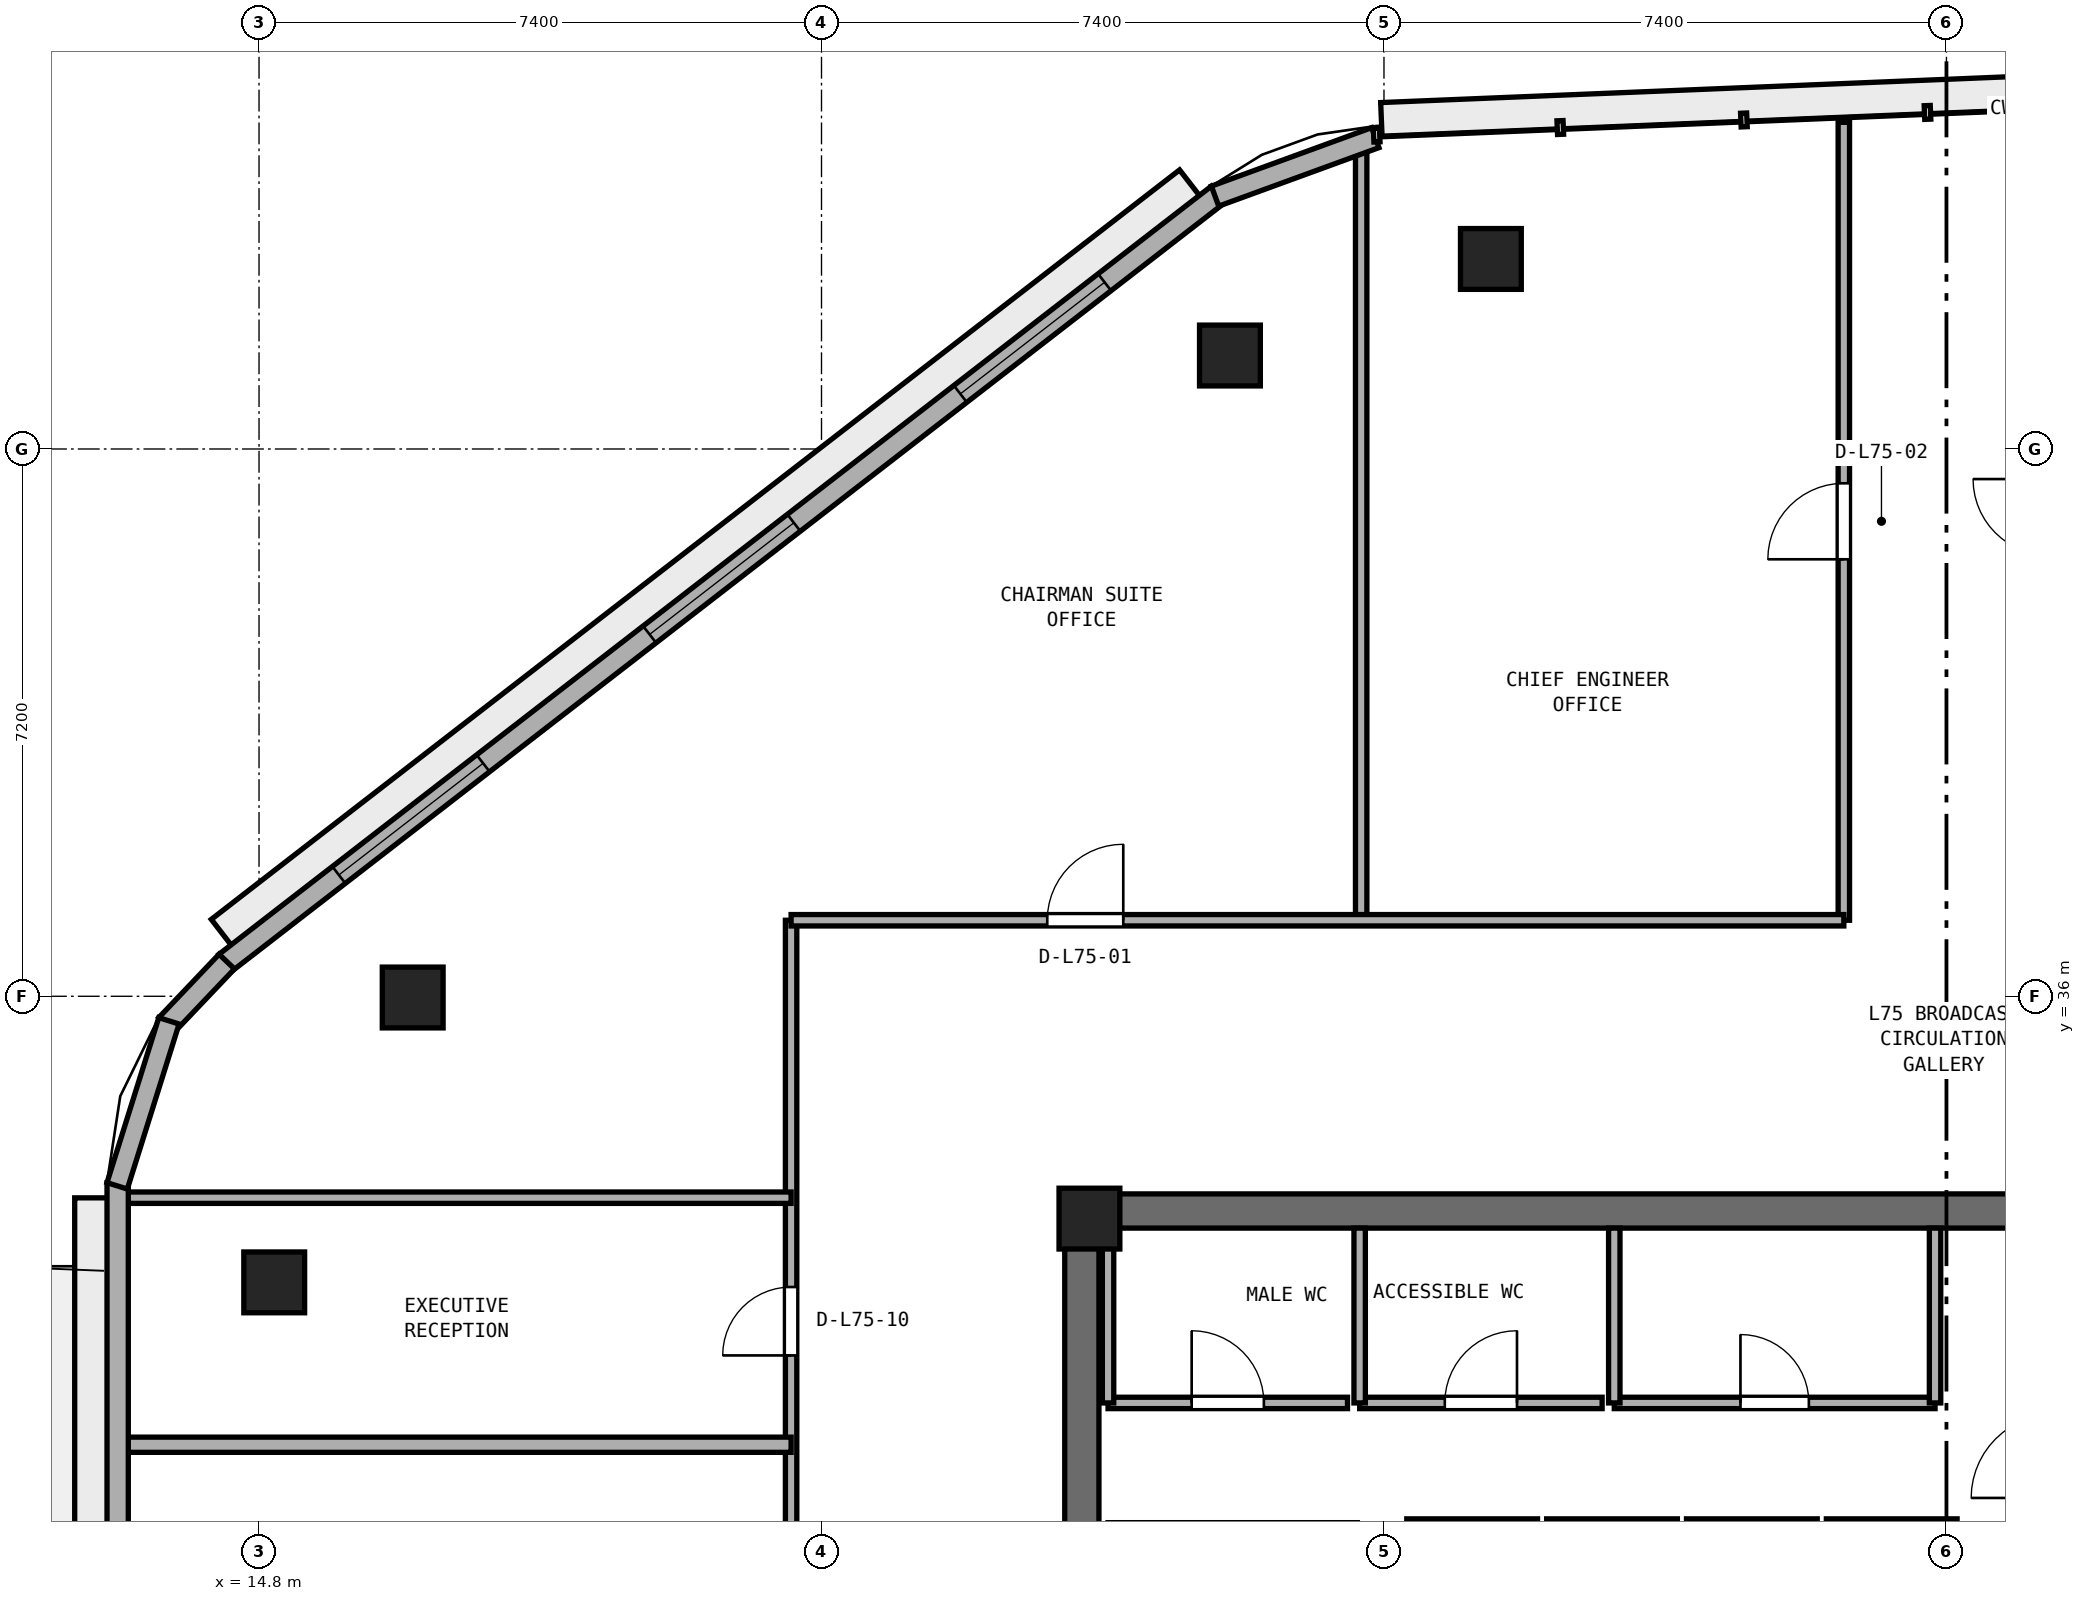
"""IFC4 building model, lengths in metres.
Left out: names, types, materials, properties, quantities, classifications, styles, units other than length and angle.
Written with IfcOpenShell. Run it as: python <this file> out.ifc"""

import sys

from ifc_helpers import new_model, si_unit, direction, frame, frame_2d, origin, origin_2d, place, context, subcontext, project, spatial, rectangle, extrude, element, fill, save


model = new_model("IFC4")
c1 = context("Model", 3, precision=1e-05, world=origin(), true_north=direction((0.0, 1.0)))
c2 = subcontext(c1, "Body", "Model", "MODEL_VIEW")
j1 = project(units=[si_unit("LENGTHUNIT", "METRE"), si_unit("PLANEANGLEUNIT", "RADIAN")], contexts=[c1])
p1 = place(None, origin())
s1 = spatial("IfcSite", under=j1, at=p1, CompositionType="ELEMENT")
p2 = place(p1, origin())
s2 = spatial("IfcBuilding", under=s1, at=p2, CompositionType="ELEMENT")
p3 = place(p2, frame((0.0, 0.0, 293.4)))
s3 = spatial("IfcBuildingStorey", under=s2, at=p3, CompositionType="ELEMENT", Elevation=293.4)
p4 = place(p3, frame((25.4, 33.175, 0.0), z_axis=(0.0, 0.0, 1.0), x_axis=(1.0, 0.0, 0.0)))
e1 = element("IfcWall", 1, at=p4, inside=s3, PredefinedType="SHEAR", context=c2, shape_type="SweptSolid", body=[
    extrude(rectangle(XDim=23.2, YDim=0.45, at=frame_2d((11.6, 0.0))), origin(), (0.0, 0.0, 1.0), 3.54),
])
p5 = place(p3, frame((25.625, 17.45, 0.0), z_axis=(0.0, 0.0, 1.0), x_axis=(0.0, 1.0, 0.0)))
e2 = element("IfcWall", 2, at=p5, inside=s3, PredefinedType="SHEAR", context=c2, shape_type="SweptSolid", body=[
    extrude(rectangle(XDim=15.5, YDim=0.45, at=frame_2d((7.75, 0.0))), origin(), (0.0, 0.0, 1.0), 3.54),
])
p6 = place(p5, frame((7.0, 0.0, 0.0)))
e3 = element("IfcOpeningElement", 3, at=p6, cuts=e2, PredefinedType="OPENING", context=c2, shape_type="SweptSolid", body=[
    extrude(rectangle(XDim=1.5, YDim=2.15, at=frame_2d((0.75, 1.075))), frame((0.0, 0.235, 0.0), z_axis=(0.0, -1.0, 0.0), x_axis=(1.0, 0.0, 0.0)), (0.0, 0.0, 1.0), 0.47),
])
p7 = place(p3, frame((25.725, 33.075, 0.0), z_axis=(0.0, 0.0, 1.0), x_axis=(1.0, 0.0, 0.0)))
e4 = element("IfcColumn", 4, at=p7, inside=s3, PredefinedType="PILASTER", context=c2, shape_type="SweptSolid", body=[
    extrude(rectangle(XDim=0.8, YDim=0.8, at=origin_2d()), origin(), (0.0, 0.0, 1.0), 3.8),
])
for number, where, z_axis, x_axis in (
    (5, (31.007, 45.7, 0.0), (0.0, 0.0, 1.0), (1.0, 0.0, 0.0)),
    (6, (27.573, 44.43, 0.0), (0.0, 0.0, 1.0), (1.0, 0.0, 0.0)),
    (7, (16.822, 35.984, 0.0), (0.0, 0.0, 1.0), (1.0, 0.0, 0.0)),
    (8, (15.0, 32.236, 0.0), (0.0, 0.0, 1.0), (1.0, 0.0, 0.0)),
):
    element("IfcColumn", number, at=place(p3, frame(where, z_axis=z_axis, x_axis=x_axis)), inside=s3, PredefinedType="COLUMN", context=c2, shape_type="SweptSolid", body=[
        extrude(rectangle(XDim=0.8, YDim=0.8, at=origin_2d()), origin(), (0.0, 0.0, 1.0), 3.8),
    ])
p8 = place(p3, frame((29.9, 29.0, 0.0), z_axis=(0.0, 0.0, 1.0), x_axis=(1.0, 0.0, 0.0)))
e9 = element("IfcWall", 9, at=p8, inside=s3, PredefinedType="SHEAR", context=c2, shape_type="SweptSolid", body=[
    extrude(rectangle(XDim=1.72, YDim=0.25, at=frame_2d((0.86, 0.0))), origin(), (0.0, 0.0, 1.0), 3.54),
])
for number, where, z_axis, x_axis in (
    (10, (31.74, 29.0, 0.0), (0.0, 0.0, 1.0), (1.0, 0.0, 0.0)),
    (11, (33.58, 29.0, 0.0), (0.0, 0.0, 1.0), (1.0, 0.0, 0.0)),
    (12, (35.42, 29.0, 0.0), (0.0, 0.0, 1.0), (1.0, 0.0, 0.0)),
):
    element("IfcWall", number, at=place(p3, frame(where, z_axis=z_axis, x_axis=x_axis)), inside=s3, PredefinedType="SHEAR", context=c2, shape_type="SweptSolid", body=[
        extrude(rectangle(XDim=1.72, YDim=0.25, at=frame_2d((0.86, 0.0))), origin(), (0.0, 0.0, 1.0), 3.54),
    ])
p9 = place(p3, frame((25.97, 30.65, 0.0), z_axis=(0.0, 0.0, 1.0), x_axis=(1.0, 0.0, 0.0)))
e13 = element("IfcWall", 13, at=p9, inside=s3, PredefinedType="PARTITIONING", context=c2, shape_type="SweptSolid", body=[
    extrude(rectangle(XDim=3.15, YDim=0.15, at=frame_2d((1.575, 0.0))), origin(), (0.0, 0.0, 1.0), 3.54),
])
p10 = place(p9, frame((1.1, 0.0, 0.0)))
e14 = element("IfcOpeningElement", 14, at=p10, cuts=e13, PredefinedType="OPENING", context=c2, shape_type="SweptSolid", body=[
    extrude(rectangle(XDim=0.95, YDim=2.1, at=frame_2d((0.475, 1.05))), frame((0.0, 0.085, 0.0), z_axis=(0.0, -1.0, 0.0), x_axis=(1.0, 0.0, 0.0)), (0.0, 0.0, 1.0), 0.17),
])
p11 = place(p3, frame((25.97, 30.65, 0.0), z_axis=(0.0, 0.0, 1.0), x_axis=(0.0, 1.0, 0.0)))
e15 = element("IfcWall", 15, at=p11, inside=s3, PredefinedType="PARTITIONING", context=c2, shape_type="SweptSolid", body=[
    extrude(rectangle(XDim=2.3, YDim=0.15, at=frame_2d((1.15, 0.0))), origin(), (0.0, 0.0, 1.0), 2.64),
])
p12 = place(p3, frame((29.28, 30.65, 0.0), z_axis=(0.0, 0.0, 1.0), x_axis=(1.0, 0.0, 0.0)))
e16 = element("IfcWall", 16, at=p12, inside=s3, PredefinedType="PARTITIONING", context=c2, shape_type="SweptSolid", body=[
    extrude(rectangle(XDim=3.19, YDim=0.15, at=frame_2d((1.595, 0.0))), origin(), (0.0, 0.0, 1.0), 3.54),
])
p13 = place(p12, frame((1.12, 0.0, 0.0)))
e17 = element("IfcOpeningElement", 17, at=p13, cuts=e16, PredefinedType="OPENING", context=c2, shape_type="SweptSolid", body=[
    extrude(rectangle(XDim=0.95, YDim=2.1, at=frame_2d((0.475, 1.05))), frame((0.0, 0.085, 0.0), z_axis=(0.0, -1.0, 0.0), x_axis=(1.0, 0.0, 0.0)), (0.0, 0.0, 1.0), 0.17),
])
p14 = place(p3, frame((29.28, 30.65, 0.0), z_axis=(0.0, 0.0, 1.0), x_axis=(0.0, 1.0, 0.0)))
e18 = element("IfcWall", 18, at=p14, inside=s3, PredefinedType="PARTITIONING", context=c2, shape_type="SweptSolid", body=[
    extrude(rectangle(XDim=2.3, YDim=0.15, at=frame_2d((1.15, 0.0))), origin(), (0.0, 0.0, 1.0), 3.54),
])
p15 = place(p3, frame((32.63, 30.65, 0.0), z_axis=(0.0, 0.0, 1.0), x_axis=(1.0, 0.0, 0.0)))
e19 = element("IfcWall", 19, at=p15, inside=s3, PredefinedType="PARTITIONING", context=c2, shape_type="SweptSolid", body=[
    extrude(rectangle(XDim=4.22, YDim=0.15, at=frame_2d((2.11, 0.0))), origin(), (0.0, 0.0, 1.0), 3.54),
])
p16 = place(p15, frame((1.66, 0.0, 0.0)))
e20 = element("IfcOpeningElement", 20, at=p16, cuts=e19, PredefinedType="OPENING", context=c2, shape_type="SweptSolid", body=[
    extrude(rectangle(XDim=0.9, YDim=2.1, at=frame_2d((0.45, 1.05))), frame((0.0, 0.085, 0.0), z_axis=(0.0, -1.0, 0.0), x_axis=(1.0, 0.0, 0.0)), (0.0, 0.0, 1.0), 0.17),
])
for number, where, z_axis, x_axis in (
    (21, (32.63, 30.65, 0.0), (0.0, 0.0, 1.0), (0.0, 1.0, 0.0)),
    (22, (36.85, 30.65, 0.0), (0.0, 0.0, 1.0), (0.0, 1.0, 0.0)),
):
    element("IfcWall", number, at=place(p3, frame(where, z_axis=z_axis, x_axis=x_axis)), inside=s3, PredefinedType="PARTITIONING", context=c2, shape_type="SweptSolid", body=[
        extrude(rectangle(XDim=2.3, YDim=0.15, at=frame_2d((1.15, 0.0))), origin(), (0.0, 0.0, 1.0), 3.54),
    ])
p17 = place(p3, frame((35.65, 37.0, 0.0), z_axis=(0.0, 0.0, 1.0), x_axis=(0.0, 1.0, 0.0)))
e23 = element("IfcWall", 23, at=p17, inside=s3, PredefinedType="PARTITIONING", context=c2, shape_type="SweptSolid", body=[
    extrude(rectangle(XDim=10.498, YDim=0.15, at=frame_2d((5.249, 0.0))), origin(), (0.0, 0.0, 1.0), 3.54),
])
p18 = place(p17, frame((4.749, 0.0, 0.0)))
e24 = element("IfcOpeningElement", 24, at=p18, cuts=e23, PredefinedType="OPENING", context=c2, shape_type="SweptSolid", body=[
    extrude(rectangle(XDim=1.0, YDim=2.12, at=frame_2d((0.5, 1.06))), frame((0.0, 0.085, 0.0), z_axis=(0.0, -1.0, 0.0), x_axis=(1.0, 0.0, 0.0)), (0.0, 0.0, 1.0), 0.17),
])
p19 = place(p3, frame((29.3, 37.0, 0.0), z_axis=(0.0, 0.0, 1.0), x_axis=(0.0, 1.0, 0.0)))
e25 = element("IfcWall", 25, at=p19, inside=s3, PredefinedType="PARTITIONING", context=c2, shape_type="SweptSolid", body=[
    extrude(rectangle(XDim=10.216, YDim=0.15, at=frame_2d((5.108, 0.0))), origin(), (0.0, 0.0, 1.0), 3.54),
])
p20 = place(p3, frame((21.8, 7.79, 0.0), z_axis=(0.0, 0.0, 1.0), x_axis=(0.0, 1.0, 0.0)))
e26 = element("IfcWall", 26, at=p20, inside=s3, PredefinedType="PARTITIONING", context=c2, shape_type="SweptSolid", body=[
    extrude(rectangle(XDim=29.21, YDim=0.15, at=frame_2d((14.605, 0.0))), origin(), (0.0, 0.0, 1.0), 3.54),
])
p21 = place(p20, frame((9.76, 0.0, 0.0)))
e27 = element("IfcOpeningElement", 27, at=p21, cuts=e26, PredefinedType="OPENING", context=c2, shape_type="SweptSolid", body=[
    extrude(rectangle(XDim=0.9, YDim=2.1, at=frame_2d((0.45, 1.05))), frame((0.0, 0.085, 0.0), z_axis=(0.0, -1.0, 0.0), x_axis=(1.0, 0.0, 0.0)), (0.0, 0.0, 1.0), 0.17),
])
p22 = place(p20, frame((18.11, 0.0, 0.0)))
e28 = element("IfcOpeningElement", 28, at=p22, cuts=e26, PredefinedType="OPENING", context=c2, shape_type="SweptSolid", body=[
    extrude(rectangle(XDim=0.9, YDim=2.1, at=frame_2d((0.45, 1.05))), frame((0.0, 0.085, 0.0), z_axis=(0.0, -1.0, 0.0), x_axis=(1.0, 0.0, 0.0)), (0.0, 0.0, 1.0), 0.17),
])
p23 = place(p20, frame((23.485, 0.0, 0.0)))
e29 = element("IfcOpeningElement", 29, at=p23, cuts=e26, PredefinedType="OPENING", context=c2, shape_type="SweptSolid", body=[
    extrude(rectangle(XDim=0.9, YDim=2.1, at=frame_2d((0.45, 1.05))), frame((0.0, 0.085, 0.0), z_axis=(0.0, -1.0, 0.0), x_axis=(1.0, 0.0, 0.0)), (0.0, 0.0, 1.0), 0.17),
])
p24 = place(p3, frame((13.005, 30.1, 0.0), z_axis=(0.0, 0.0, 1.0), x_axis=(1.0, 0.0, 0.0)))
e30 = element("IfcWall", 30, at=p24, inside=s3, PredefinedType="PARTITIONING", context=c2, shape_type="SweptSolid", body=[
    extrude(rectangle(XDim=8.795, YDim=0.2, at=frame_2d((4.397, 0.0))), origin(), (0.0, 0.0, 1.0), 3.54),
])
p25 = place(p3, frame((13.005, 33.35, 0.0), z_axis=(0.0, 0.0, 1.0), x_axis=(1.0, 0.0, 0.0)))
e31 = element("IfcWall", 31, at=p25, inside=s3, PredefinedType="PARTITIONING", context=c2, shape_type="SweptSolid", body=[
    extrude(rectangle(XDim=8.795, YDim=0.15, at=frame_2d((4.397, 0.0))), origin(), (0.0, 0.0, 1.0), 3.54),
])
p26 = place(p3, frame((21.8, 37.0, 0.0), z_axis=(0.0, 0.0, 1.0), x_axis=(1.0, 0.0, 0.0)))
e32 = element("IfcWall", 32, at=p26, inside=s3, PredefinedType="PARTITIONING", context=c2, shape_type="SweptSolid", body=[
    extrude(rectangle(XDim=13.85, YDim=0.15, at=frame_2d((6.925, 0.0))), origin(), (0.0, 0.0, 1.0), 3.54),
])
p27 = place(p26, frame((3.37, 0.0, 0.0)))
e33 = element("IfcOpeningElement", 33, at=p27, cuts=e32, PredefinedType="OPENING", context=c2, shape_type="SweptSolid", body=[
    extrude(rectangle(XDim=1.0, YDim=2.12, at=frame_2d((0.5, 1.06))), frame((0.0, 0.085, 0.0), z_axis=(0.0, -1.0, 0.0), x_axis=(1.0, 0.0, 0.0)), (0.0, 0.0, 1.0), 0.17),
])
p28 = place(p3, frame((27.415, 46.547, 0.0), z_axis=(0.0, 0.0, 1.0), x_axis=(-0.790789745248, -0.612087884875, 0.0)))
e34 = element("IfcWall", 34, at=p28, inside=s3, PredefinedType="STANDARD", context=c2, shape_type="SweptSolid", body=[
    extrude(rectangle(XDim=16.509, YDim=0.28, at=frame_2d((8.254, 0.0))), origin(), (0.0, 0.0, 1.0), 3.54),
])
p29 = place(p28, frame((1.885, 0.0, 0.9)))
e35 = element("IfcOpeningElement", 35, at=p29, cuts=e34, PredefinedType="OPENING", context=c2, shape_type="SweptSolid", body=[
    extrude(rectangle(XDim=2.4, YDim=1.75, at=frame_2d((1.2, 0.875))), frame((0.0, 0.15, 0.0), z_axis=(0.0, -1.0, 0.0), x_axis=(1.0, 0.0, 0.0)), (0.0, 0.0, 1.0), 0.3),
])
p30 = place(p28, frame((7.055, 0.0, 0.9)))
e36 = element("IfcOpeningElement", 36, at=p30, cuts=e34, PredefinedType="OPENING", context=c2, shape_type="SweptSolid", body=[
    extrude(rectangle(XDim=2.4, YDim=1.75, at=frame_2d((1.2, 0.875))), frame((0.0, 0.15, 0.0), z_axis=(0.0, -1.0, 0.0), x_axis=(1.0, 0.0, 0.0)), (0.0, 0.0, 1.0), 0.3),
])
p31 = place(p28, frame((12.224, 0.0, 0.9)))
e37 = element("IfcOpeningElement", 37, at=p31, cuts=e34, PredefinedType="OPENING", context=c2, shape_type="SweptSolid", body=[
    extrude(rectangle(XDim=2.4, YDim=1.75, at=frame_2d((1.2, 0.875))), frame((0.0, 0.15, 0.0), z_axis=(0.0, -1.0, 0.0), x_axis=(1.0, 0.0, 0.0)), (0.0, 0.0, 1.0), 0.3),
])
p32 = place(p3, frame((12.94, 33.548, 0.0), z_axis=(0.0, 0.0, 1.0), x_axis=(0.0, -1.0, 0.0)))
e38 = element("IfcWall", 38, at=p32, inside=s3, PredefinedType="STANDARD", context=c2, shape_type="SweptSolid", body=[
    extrude(rectangle(XDim=17.496, YDim=0.28, at=frame_2d((8.748, 0.0))), origin(), (0.0, 0.0, 1.0), 3.54),
])
p33 = place(p32, frame((8.198, 0.0, 0.0)))
e39 = element("IfcOpeningElement", 39, at=p33, cuts=e38, PredefinedType="OPENING", context=c2, shape_type="SweptSolid", body=[
    extrude(rectangle(XDim=1.1, YDim=2.2, at=frame_2d((0.55, 1.1))), frame((0.0, 0.15, 0.0), z_axis=(0.0, -1.0, 0.0), x_axis=(1.0, 0.0, 0.0)), (0.0, 0.0, 1.0), 0.3),
])
p34 = place(p32, frame((13.047, 0.0, 0.9)))
e40 = element("IfcOpeningElement", 40, at=p34, cuts=e38, PredefinedType="OPENING", context=c2, shape_type="SweptSolid", body=[
    extrude(rectangle(XDim=2.4, YDim=1.75, at=frame_2d((1.2, 0.875))), frame((0.0, 0.15, 0.0), z_axis=(0.0, -1.0, 0.0), x_axis=(1.0, 0.0, 0.0)), (0.0, 0.0, 1.0), 0.3),
])
p35 = place(p3, frame((29.486, 47.296, 0.0), z_axis=(0.0, 0.0, 1.0), x_axis=(-0.939434048497, -0.342729731019, 0.0)))
e41 = element("IfcWall", 41, at=p35, inside=s3, PredefinedType="STANDARD", context=c2, shape_type="SweptSolid", body=[
    extrude(rectangle(XDim=2.245, YDim=0.28, at=frame_2d((1.122, 0.0))), origin(), (0.0, 0.0, 1.0), 3.54),
])
p36 = place(p3, frame((14.375, 36.457, 0.0), z_axis=(0.0, 0.0, 1.0), x_axis=(-0.68895569752, -0.724803453948, 0.0)))
e42 = element("IfcWall", 42, at=p36, inside=s3, PredefinedType="STANDARD", context=c2, shape_type="SweptSolid", body=[
    extrude(rectangle(XDim=1.151, YDim=0.28, at=frame_2d((0.575, 0.0))), origin(), (0.0, 0.0, 1.0), 3.54),
])
p37 = place(p3, frame((13.615, 35.677, 0.0), z_axis=(0.0, 0.0, 1.0), x_axis=(-0.299374552426, -0.954135670311, 0.0)))
e43 = element("IfcWall", 43, at=p37, inside=s3, PredefinedType="STANDARD", context=c2, shape_type="SweptSolid", body=[
    extrude(rectangle(XDim=2.275, YDim=0.28, at=frame_2d((1.138, 0.0))), origin(), (0.0, 0.0, 1.0), 3.54),
])
p38 = place(p10, origin())
e44 = element("IfcDoor", 44, at=p38, inside=s3, OperationType="SINGLE_SWING_LEFT", PredefinedType="DOOR", context=c2, shape_type="SweptSolid", body=[
    extrude(rectangle(XDim=0.95, YDim=2.1, at=frame_2d((0.475, 1.05))), frame((0.0, 0.025, 0.0), z_axis=(0.0, -1.0, 0.0), x_axis=(1.0, 0.0, 0.0)), (0.0, 0.0, 1.0), 0.05),
])
fill(e14, e44)
p39 = place(p13, origin())
e45 = element("IfcDoor", 45, at=p39, inside=s3, OperationType="SINGLE_SWING_RIGHT", PredefinedType="DOOR", context=c2, shape_type="SweptSolid", body=[
    extrude(rectangle(XDim=0.95, YDim=2.1, at=frame_2d((0.475, 1.05))), frame((0.0, 0.025, 0.0), z_axis=(0.0, -1.0, 0.0), x_axis=(1.0, 0.0, 0.0)), (0.0, 0.0, 1.0), 0.05),
])
fill(e17, e45)
p40 = place(p16, origin())
e46 = element("IfcDoor", 46, at=p40, inside=s3, OperationType="SINGLE_SWING_LEFT", PredefinedType="DOOR", context=c2, shape_type="SweptSolid", body=[
    extrude(rectangle(XDim=0.9, YDim=2.1, at=frame_2d((0.45, 1.05))), frame((0.0, 0.025, 0.0), z_axis=(0.0, -1.0, 0.0), x_axis=(1.0, 0.0, 0.0)), (0.0, 0.0, 1.0), 0.05),
])
fill(e20, e46)
p41 = place(p27, origin())
e47 = element("IfcDoor", 47, at=p41, inside=s3, OperationType="SINGLE_SWING_RIGHT", PredefinedType="DOOR", context=c2, shape_type="SweptSolid", body=[
    extrude(rectangle(XDim=1.0, YDim=2.12, at=frame_2d((0.5, 1.06))), frame((0.0, 0.025, 0.0), z_axis=(0.0, -1.0, 0.0), x_axis=(1.0, 0.0, 0.0)), (0.0, 0.0, 1.0), 0.05),
])
fill(e33, e47)
p42 = place(p18, origin())
e48 = element("IfcDoor", 48, at=p42, inside=s3, OperationType="SINGLE_SWING_LEFT", PredefinedType="DOOR", context=c2, shape_type="SweptSolid", body=[
    extrude(rectangle(XDim=1.0, YDim=2.12, at=frame_2d((0.5, 1.06))), frame((0.0, 0.025, 0.0), z_axis=(0.0, -1.0, 0.0), x_axis=(1.0, 0.0, 0.0)), (0.0, 0.0, 1.0), 0.05),
])
fill(e24, e48)
p43 = place(p23, origin())
e49 = element("IfcDoor", 49, at=p43, inside=s3, OperationType="SINGLE_SWING_LEFT", PredefinedType="DOOR", context=c2, shape_type="SweptSolid", body=[
    extrude(rectangle(XDim=0.9, YDim=2.1, at=frame_2d((0.45, 1.05))), frame((0.0, 0.025, 0.0), z_axis=(0.0, -1.0, 0.0), x_axis=(1.0, 0.0, 0.0)), (0.0, 0.0, 1.0), 0.05),
])
fill(e29, e49)
p44 = place(p29, origin())
e50 = element("IfcWindow", 50, at=p44, inside=s3, PartitioningType="SINGLE_PANEL", PredefinedType="WINDOW", context=c2, shape_type="SweptSolid", body=[
    extrude(rectangle(XDim=2.4, YDim=1.75, at=frame_2d((1.2, 0.875))), frame((0.0, 0.03, 0.0), z_axis=(0.0, -1.0, 0.0), x_axis=(1.0, 0.0, 0.0)), (0.0, 0.0, 1.0), 0.06),
])
fill(e35, e50)
p45 = place(p30, origin())
e51 = element("IfcWindow", 51, at=p45, inside=s3, PartitioningType="SINGLE_PANEL", PredefinedType="WINDOW", context=c2, shape_type="SweptSolid", body=[
    extrude(rectangle(XDim=2.4, YDim=1.75, at=frame_2d((1.2, 0.875))), frame((0.0, 0.03, 0.0), z_axis=(0.0, -1.0, 0.0), x_axis=(1.0, 0.0, 0.0)), (0.0, 0.0, 1.0), 0.06),
])
fill(e36, e51)
p46 = place(p31, origin())
e52 = element("IfcWindow", 52, at=p46, inside=s3, PartitioningType="SINGLE_PANEL", PredefinedType="WINDOW", context=c2, shape_type="SweptSolid", body=[
    extrude(rectangle(XDim=2.4, YDim=1.75, at=frame_2d((1.2, 0.875))), frame((0.0, 0.03, 0.0), z_axis=(0.0, -1.0, 0.0), x_axis=(1.0, 0.0, 0.0)), (0.0, 0.0, 1.0), 0.06),
])
fill(e37, e52)
save(model, sys.argv[1])
